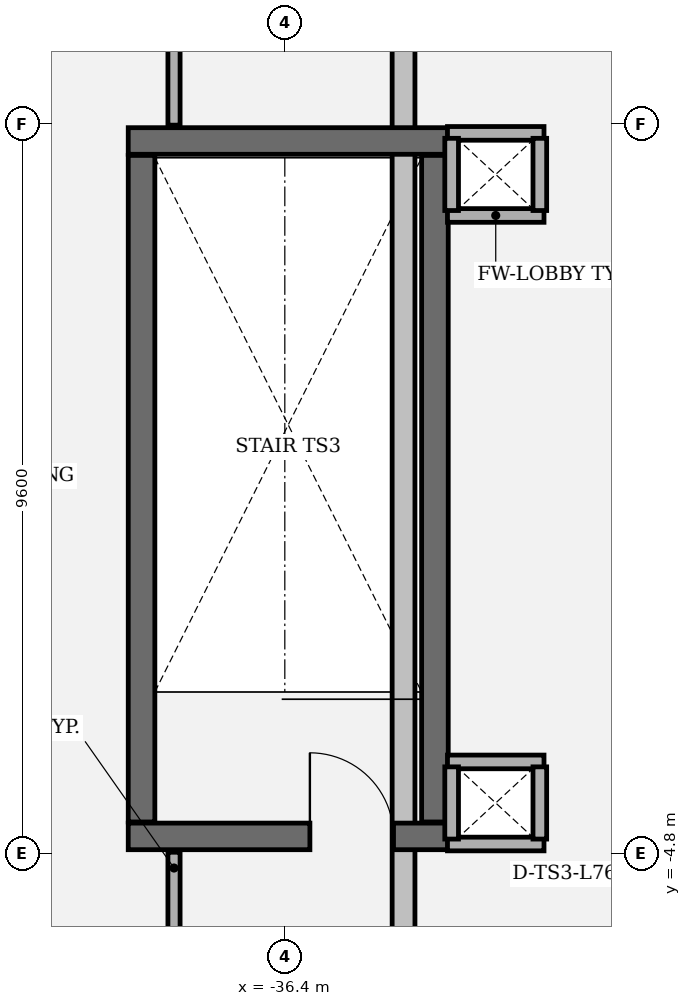
"""IFC4 building model, lengths in metres.
Left out: names, types, materials, properties, quantities, classifications, styles, units other than length and angle.
Written with IfcOpenShell. Run it as: python <this file> out.ifc"""

import sys

from ifc_helpers import new_model, si_unit, direction, frame, frame_2d, origin, place, context, subcontext, project, spatial, rectangle, extrude, element, fill, save


model = new_model("IFC4")
c1 = context("Model", 3, precision=1e-05, world=origin(), true_north=direction((0.0, 1.0)))
c2 = subcontext(c1, "Body", "Model", "MODEL_VIEW")
j1 = project(units=[si_unit("LENGTHUNIT", "METRE"), si_unit("PLANEANGLEUNIT", "RADIAN")], contexts=[c1])
p1 = place(None, origin())
s1 = spatial("IfcSite", under=j1, at=p1, CompositionType="ELEMENT")
p2 = place(p1, origin())
s2 = spatial("IfcBuilding", under=s1, at=p2, CompositionType="ELEMENT")
p3 = place(p2, frame((0.0, 0.0, 327.0)))
s3 = spatial("IfcBuildingStorey", under=s2, at=p3, CompositionType="ELEMENT", Elevation=327.0)
p4 = place(p3, frame((-38.46, -4.575, 0.0), z_axis=(0.0, 0.0, 1.0), x_axis=(1.0, 0.0, 0.0)))
e1 = element("IfcWall", 1, at=p4, inside=s3, PredefinedType="SHEAR", context=c2, shape_type="SweptSolid", body=[
    extrude(rectangle(XDim=4.21, YDim=0.35, at=frame_2d((2.105, 0.0))), origin(), (0.0, 0.0, 1.0), 3.92),
])
p5 = place(p4, frame((2.39, 0.0, 0.0)))
e2 = element("IfcOpeningElement", 2, at=p5, cuts=e1, PredefinedType="OPENING", context=c2, shape_type="SweptSolid", body=[
    extrude(rectangle(XDim=1.1, YDim=2.2, at=frame_2d((0.55, 1.1))), frame((0.0, 0.185, 0.0), z_axis=(0.0, -1.0, 0.0), x_axis=(1.0, 0.0, 0.0)), (0.0, 0.0, 1.0), 0.37),
])
p6 = place(p3, frame((-34.25, 4.575, 0.0), z_axis=(0.0, 0.0, 1.0), x_axis=(-1.0, 0.0, 0.0)))
e3 = element("IfcWall", 3, at=p6, inside=s3, PredefinedType="SHEAR", context=c2, shape_type="SweptSolid", body=[
    extrude(rectangle(XDim=4.21, YDim=0.35, at=frame_2d((2.105, 0.0))), origin(), (0.0, 0.0, 1.0), 3.92),
])
for number, where, z_axis, x_axis in (
    (4, (-34.425, -4.385, 0.0), (0.0, 0.0, 1.0), (0.0, 1.0, 0.0)),
    (5, (-38.285, 4.385, 0.0), (0.0, 0.0, 1.0), (0.0, -1.0, 0.0)),
):
    element("IfcWall", number, at=place(p3, frame(where, z_axis=z_axis, x_axis=x_axis)), inside=s3, PredefinedType="SHEAR", context=c2, shape_type="SweptSolid", body=[
        extrude(rectangle(XDim=8.77, YDim=0.35, at=frame_2d((4.385, 0.0))), origin(), (0.0, 0.0, 1.0), 3.92),
    ])
for number, where, z_axis, x_axis in (
    (6, (-32.99, 3.595, 0.0), (0.0, 0.0, 1.0), (-1.0, 0.0, 0.0)),
    (7, (-34.26, 4.675, 0.0), (0.0, 0.0, 1.0), (1.0, 0.0, 0.0)),
):
    element("IfcWall", number, at=place(p3, frame(where, z_axis=z_axis, x_axis=x_axis)), inside=s3, PredefinedType="PARTITIONING", context=c2, shape_type="SweptSolid", body=[
        extrude(rectangle(XDim=1.27, YDim=0.18, at=frame_2d((0.635, 0.0))), origin(), (0.0, 0.0, 1.0), 3.92),
    ])
for number, where, z_axis, x_axis in (
    (8, (-34.205, 3.66, 0.0), (0.0, 0.0, 1.0), (0.0, 1.0, 0.0)),
    (9, (-33.045, 4.61, 0.0), (0.0, 0.0, 1.0), (0.0, -1.0, 0.0)),
):
    element("IfcWall", number, at=place(p3, frame(where, z_axis=z_axis, x_axis=x_axis)), inside=s3, PredefinedType="PARTITIONING", context=c2, shape_type="SweptSolid", body=[
        extrude(rectangle(XDim=0.95, YDim=0.18, at=frame_2d((0.475, 0.0))), origin(), (0.0, 0.0, 1.0), 3.92),
    ])
for number, where, z_axis, x_axis in (
    (10, (-32.99, -4.675, 0.0), (0.0, 0.0, 1.0), (-1.0, 0.0, 0.0)),
    (11, (-34.26, -3.595, 0.0), (0.0, 0.0, 1.0), (1.0, 0.0, 0.0)),
):
    element("IfcWall", number, at=place(p3, frame(where, z_axis=z_axis, x_axis=x_axis)), inside=s3, PredefinedType="PARTITIONING", context=c2, shape_type="SweptSolid", body=[
        extrude(rectangle(XDim=1.27, YDim=0.18, at=frame_2d((0.635, 0.0))), origin(), (0.0, 0.0, 1.0), 3.92),
    ])
for number, where, z_axis, x_axis in (
    (12, (-34.205, -4.61, 0.0), (0.0, 0.0, 1.0), (0.0, 1.0, 0.0)),
    (13, (-33.045, -3.66, 0.0), (0.0, 0.0, 1.0), (0.0, -1.0, 0.0)),
):
    element("IfcWall", number, at=place(p3, frame(where, z_axis=z_axis, x_axis=x_axis)), inside=s3, PredefinedType="PARTITIONING", context=c2, shape_type="SweptSolid", body=[
        extrude(rectangle(XDim=0.95, YDim=0.18, at=frame_2d((0.475, 0.0))), origin(), (0.0, 0.0, 1.0), 3.92),
    ])
p7 = place(p3, frame((-37.858, -8.854, 0.0), z_axis=(0.0, 0.0, 1.0), x_axis=(0.0, 1.0, 0.0)))
e14 = element("IfcWall", 14, at=p7, inside=s3, PredefinedType="PARTITIONING", context=c2, shape_type="SweptSolid", body=[
    extrude(rectangle(XDim=4.071, YDim=0.16, at=frame_2d((2.036, 0.0))), origin(), (0.0, 0.0, 1.0), 3.92),
])
p8 = place(p7, frame((1.436, 0.0, 0.0)))
e15 = element("IfcOpeningElement", 15, at=p8, cuts=e14, PredefinedType="OPENING", context=c2, shape_type="SweptSolid", body=[
    extrude(rectangle(XDim=1.2, YDim=2.15, at=frame_2d((0.6, 1.075))), frame((0.0, 0.09, 0.0), z_axis=(0.0, -1.0, 0.0), x_axis=(1.0, 0.0, 0.0)), (0.0, 0.0, 1.0), 0.18),
])
p9 = place(p3, frame((-37.858, 4.783, 0.0), z_axis=(0.0, 0.0, 1.0), x_axis=(0.0, 1.0, 0.0)))
e16 = element("IfcWall", 16, at=p9, inside=s3, PredefinedType="PARTITIONING", context=c2, shape_type="SweptSolid", body=[
    extrude(rectangle(XDim=4.071, YDim=0.16, at=frame_2d((2.036, 0.0))), origin(), (0.0, 0.0, 1.0), 3.92),
])
p10 = place(p5, origin())
e17 = element("IfcDoor", 17, at=p10, inside=s3, OperationType="SINGLE_SWING_LEFT", PredefinedType="DOOR", context=c2, shape_type="SweptSolid", body=[
    extrude(rectangle(XDim=1.1, YDim=2.2, at=frame_2d((0.55, 1.1))), frame((0.0, 0.025, 0.0), z_axis=(0.0, -1.0, 0.0), x_axis=(1.0, 0.0, 0.0)), (0.0, 0.0, 1.0), 0.05),
])
fill(e2, e17)
save(model, sys.argv[1])
